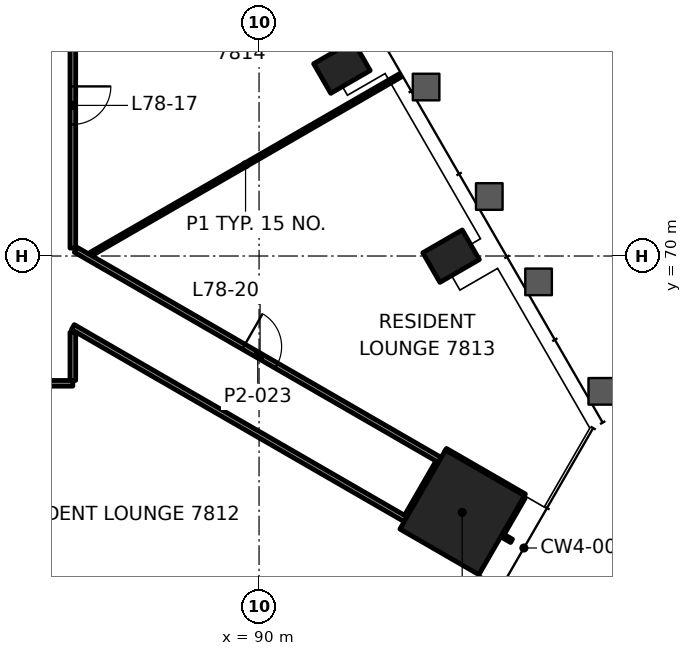
"""IFC4 building model, lengths in metres.
Left out: names, types, materials, properties, quantities, classifications, styles, units other than length and angle.
Written with IfcOpenShell. Run it as: python <this file> out.ifc"""

import sys

from ifc_helpers import new_model, si_unit, direction, frame, frame_2d, origin, origin_2d, place, context, subcontext, project, spatial, rectangle, hollow_rectangle, extrude, element, fill, save


model = new_model("IFC4")
c1 = context("Model", 3, precision=1e-05, world=origin(), true_north=direction((0.0, 1.0)))
c2 = subcontext(c1, "Body", "Model", "MODEL_VIEW")
j1 = project(units=[si_unit("LENGTHUNIT", "METRE"), si_unit("PLANEANGLEUNIT", "RADIAN")], contexts=[c1])
p1 = place(None, origin())
s1 = spatial("IfcSite", under=j1, at=p1, CompositionType="ELEMENT")
p2 = place(p1, origin())
s2 = spatial("IfcBuilding", under=s1, at=p2, CompositionType="ELEMENT")
p3 = place(p2, frame((0.0, 0.0, 319.6)))
s3 = spatial("IfcBuildingStorey", under=s2, at=p3, CompositionType="ELEMENT", Elevation=319.6)
p4 = place(p3, frame((95.345, 63.254, 0.0), z_axis=(0.0, 0.0, 1.0), x_axis=(0.5, 0.866025403784, 0.0)))
e1 = element("IfcColumn", 1, at=p4, inside=s3, PredefinedType="COLUMN", context=c2, shape_type="SweptSolid", body=[
    extrude(rectangle(XDim=2.4, YDim=2.4, at=origin_2d()), origin(), (0.0, 0.0, 1.0), 3.5),
])
for number, where, z_axis, x_axis in (
    (2, (95.052, 69.996, -0.0), (0.0, 0.0, 1.0), (-0.5, 0.866, 0.0)),
    (3, (92.181, 74.97, -0.0), (0.0, 0.0, 1.0), (-0.5, 0.866, 0.0)),
):
    element("IfcColumn", number, at=place(p3, frame(where, z_axis=z_axis, x_axis=x_axis)), inside=s3, PredefinedType="COLUMN", context=c2, shape_type="SweptSolid", body=[
        extrude(hollow_rectangle(XDim=0.9, YDim=1.2, WallThickness=0.06, at=origin_2d()), origin(), (0.0, 0.0, 1.0), 3.5),
    ])
p5 = place(p3, frame((85.099, 66.65, 0.0), z_axis=(0.0, 0.0, 1.0), x_axis=(-1.0, 0.0, 0.0)))
e4 = element("IfcWall", 4, at=p5, inside=s3, PredefinedType="PARTITIONING", context=c2, shape_type="SweptSolid", body=[
    extrude(rectangle(XDim=20.199, YDim=0.15, at=frame_2d((10.1, 0.0))), origin(), (0.0, 0.0, 1.0), 2.7),
])
p6 = place(p5, frame((1.351, 0.0, 0.0)))
e5 = element("IfcOpeningElement", 5, at=p6, cuts=e4, PredefinedType="OPENING", context=c2, shape_type="SweptSolid", body=[
    extrude(rectangle(XDim=0.9, YDim=2.1, at=frame_2d((0.45, 1.05))), frame((0.0, 0.085, 0.0), z_axis=(0.0, -1.0, 0.0), x_axis=(1.0, 0.0, 0.0)), (0.0, 0.0, 1.0), 0.17),
])
p7 = place(p5, frame((14.386, 0.0, 0.0)))
e6 = element("IfcOpeningElement", 6, at=p7, cuts=e4, PredefinedType="OPENING", context=c2, shape_type="SweptSolid", body=[
    extrude(rectangle(XDim=1.0, YDim=2.1, at=frame_2d((0.5, 1.05))), frame((0.0, 0.085, 0.0), z_axis=(0.0, -1.0, 0.0), x_axis=(1.0, 0.0, 0.0)), (0.0, 0.0, 1.0), 0.17),
])
p8 = place(p3, frame((85.574, 70.051, 0.0), z_axis=(0.0, 0.0, 1.0), x_axis=(0.86601302732, 0.500021436052, 0.0)))
e7 = element("IfcWall", 7, at=p8, inside=s3, PredefinedType="PARTITIONING", context=c2, shape_type="SweptSolid", body=[
    extrude(rectangle(XDim=9.401, YDim=0.1, at=frame_2d((4.7, 0.0))), origin(), (0.0, 0.0, 1.0), 2.688),
])
p9 = place(p3, frame((96.384, 62.654, 0.0), z_axis=(0.0, 0.0, 1.0), x_axis=(0.500022773673, 0.866012254999, 0.0)))
e8 = element("IfcWall", 8, at=p9, inside=s3, PredefinedType="PARTITIONING", context=c2, shape_type="SweptSolid", body=[
    extrude(rectangle(XDim=1.149, YDim=0.1, at=frame_2d((0.575, 0.0))), origin(), (0.0, 0.0, 1.0), 2.7),
])
p10 = place(p3, frame((93.893, 63.14, 0.0), z_axis=(0.0, 0.0, 1.0), x_axis=(0.499988108725, 0.866032269107, 0.0)))
e9 = element("IfcWall", 9, at=p10, inside=s3, PredefinedType="PARTITIONING", context=c2, shape_type="SweptSolid", body=[
    extrude(rectangle(XDim=1.644, YDim=0.15, at=frame_2d((0.822, 0.0))), origin(), (0.0, 0.0, 1.0), 2.697),
])
p11 = place(p3, frame((85.1, 66.726, 0.0), z_axis=(0.0, 0.0, 1.0), x_axis=(0.0, 1.0, 0.0)))
e10 = element("IfcWall", 10, at=p11, inside=s3, PredefinedType="PARTITIONING", context=c2, shape_type="SweptSolid", body=[
    extrude(rectangle(XDim=1.267, YDim=0.15, at=frame_2d((0.634, 0.0))), origin(), (0.0, 0.0, 1.0), 2.697),
])
p12 = place(p3, frame((85.1, 83.349, 0.0), z_axis=(0.0, 0.0, 1.0), x_axis=(0.0, -1.0, 0.0)))
e11 = element("IfcWall", 11, at=p12, inside=s3, PredefinedType="PARTITIONING", context=c2, shape_type="SweptSolid", body=[
    extrude(rectangle(XDim=13.141, YDim=0.15, at=frame_2d((6.571, 0.0))), origin(), (0.0, 0.0, 1.0), 2.7),
])
p13 = place(p12, frame((8.886, 0.0, 0.0)))
e12 = element("IfcOpeningElement", 12, at=p13, cuts=e11, PredefinedType="OPENING", context=c2, shape_type="SweptSolid", body=[
    extrude(rectangle(XDim=1.0, YDim=2.1, at=frame_2d((0.5, 1.05))), frame((0.0, 0.085, 0.0), z_axis=(0.0, -1.0, 0.0), x_axis=(1.0, 0.0, 0.0)), (0.0, 0.0, 1.0), 0.17),
])
p14 = place(p3, frame((96.984, 63.693, 0.0), z_axis=(0.0, 0.0, 1.0), x_axis=(-0.866011011868, 0.500024926702, 0.0)))
e13 = element("IfcWall", 13, at=p14, inside=s3, PredefinedType="PARTITIONING", context=c2, shape_type="SweptSolid", body=[
    extrude(rectangle(XDim=2.399, YDim=0.1, at=frame_2d((1.199, 0.0))), origin(), (0.0, 0.0, 1.0), 2.7),
])
p15 = place(p3, frame((85.175, 70.165, 0.0), z_axis=(0.0, 0.0, 1.0), x_axis=(0.866024989193, -0.500000718093, 0.0)))
e14 = element("IfcWall", 14, at=p15, inside=s3, PredefinedType="PARTITIONING", context=c2, shape_type="SweptSolid", body=[
    extrude(rectangle(XDim=11.063, YDim=0.15, at=frame_2d((5.531, 0.0))), origin(), (0.0, 0.0, 1.0), 2.7),
])
p16 = place(p15, frame((5.102, 0.0, 0.0)))
e15 = element("IfcOpeningElement", 15, at=p16, cuts=e14, PredefinedType="OPENING", context=c2, shape_type="SweptSolid", body=[
    extrude(rectangle(XDim=1.0, YDim=2.1, at=frame_2d((0.5, 1.05))), frame((0.0, 0.085, 0.0), z_axis=(0.0, -1.0, 0.0), x_axis=(1.0, 0.0, 0.0)), (0.0, 0.0, 1.0), 0.17),
])
p17 = place(p3, frame((96.644, 62.504, 0.0), z_axis=(0.0, 0.0, 1.0), x_axis=(-0.866071776036, 0.499919672301, 0.0)))
e16 = element("IfcWall", 16, at=p17, inside=s3, PredefinedType="PARTITIONING", context=c2, shape_type="SweptSolid", body=[
    extrude(rectangle(XDim=0.25, YDim=0.1, at=frame_2d((0.125, 0.0))), origin(), (0.0, 0.0, 1.0), 2.7),
])
p18 = place(p3, frame((93.855, 63.075, 0.0), z_axis=(0.0, 0.0, 1.0), x_axis=(-0.866024727794, 0.500001170848, 0.0)))
e17 = element("IfcWall", 17, at=p18, inside=s3, PredefinedType="PARTITIONING", context=c2, shape_type="SweptSolid", body=[
    extrude(rectangle(XDim=10.11, YDim=0.15, at=frame_2d((5.055, 0.0))), origin(), (0.0, 0.0, 1.0), 2.697),
])
p19 = place(p13, origin())
e18 = element("IfcDoor", 18, at=p19, inside=s3, OperationType="SINGLE_SWING_RIGHT", PredefinedType="DOOR", context=c2, shape_type="SweptSolid", body=[
    extrude(rectangle(XDim=1.0, YDim=2.1, at=frame_2d((0.5, 1.05))), frame((0.0, 0.025, 0.0), z_axis=(0.0, -1.0, 0.0), x_axis=(1.0, 0.0, 0.0)), (0.0, 0.0, 1.0), 0.05),
])
fill(e12, e18)
p20 = place(p16, origin())
e19 = element("IfcDoor", 19, at=p20, inside=s3, OperationType="SINGLE_SWING_LEFT", PredefinedType="DOOR", context=c2, shape_type="SweptSolid", body=[
    extrude(rectangle(XDim=1.0, YDim=2.1, at=frame_2d((0.5, 1.05))), frame((0.0, 0.025, 0.0), z_axis=(0.0, -1.0, 0.0), x_axis=(1.0, 0.0, 0.0)), (0.0, 0.0, 1.0), 0.05),
])
fill(e15, e19)
save(model, sys.argv[1])
